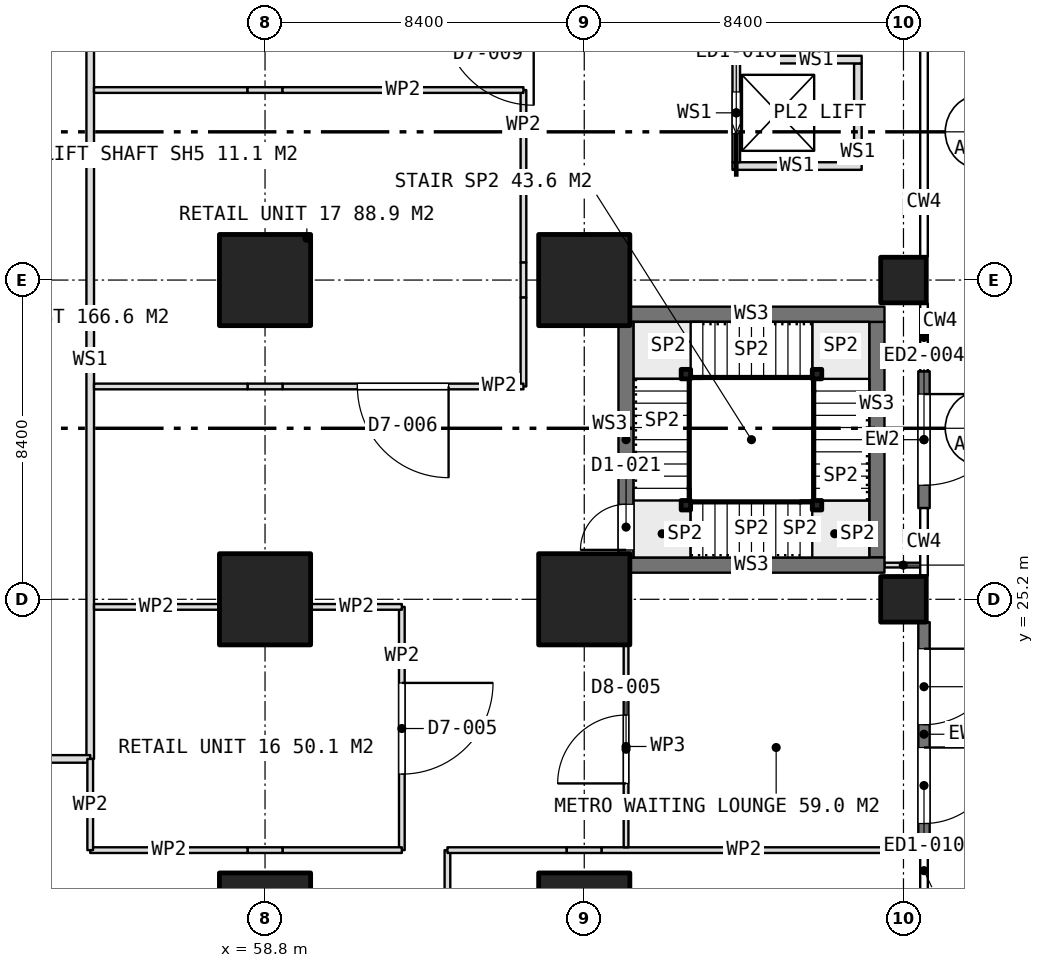
"""IFC4 building model, lengths in metres.
Left out: names, types, materials, properties, quantities, classifications, styles, units other than length and angle.
Written with IfcOpenShell. Run it as: python <this file> out.ifc"""

import sys

from ifc_helpers import new_model, si_unit, direction, frame, frame_2d, origin, origin_2d, place, context, subcontext, project, spatial, rectangle, extrude, element, fill, save


model = new_model("IFC4")
c1 = context("Model", 3, precision=1e-05, world=origin(), true_north=direction((0.0, 1.0)))
c2 = subcontext(c1, "Body", "Model", "MODEL_VIEW")
j1 = project(units=[si_unit("LENGTHUNIT", "METRE"), si_unit("PLANEANGLEUNIT", "RADIAN")], contexts=[c1])
p1 = place(None, origin())
s1 = spatial("IfcSite", under=j1, at=p1, CompositionType="ELEMENT")
p2 = place(p1, origin())
s2 = spatial("IfcBuilding", under=s1, at=p2, CompositionType="ELEMENT")
p3 = place(p2, origin())
s3 = spatial("IfcBuildingStorey", under=s2, at=p3, CompositionType="ELEMENT", Elevation=0.0)
for number, where, z_axis, x_axis in (
    (1, (58.8, 16.8, 0.0), (0.0, 0.0, 1.0), (1.0, 0.0, 0.0)),
    (2, (58.8, 25.2, 0.0), (0.0, 0.0, 1.0), (1.0, 0.0, 0.0)),
    (3, (58.8, 33.6, 0.0), (0.0, 0.0, 1.0), (1.0, 0.0, 0.0)),
    (4, (67.2, 16.8, 0.0), (0.0, 0.0, 1.0), (1.0, 0.0, 0.0)),
    (5, (67.2, 25.2, 0.0), (0.0, 0.0, 1.0), (1.0, 0.0, 0.0)),
    (6, (67.2, 33.6, 0.0), (0.0, 0.0, 1.0), (1.0, 0.0, 0.0)),
):
    element("IfcColumn", number, at=place(p3, frame(where, z_axis=z_axis, x_axis=x_axis)), inside=s3, PredefinedType="COLUMN", context=c2, shape_type="SweptSolid", body=[
        extrude(rectangle(XDim=2.4, YDim=2.4, at=origin_2d()), origin(), (0.0, 0.0, 1.0), 5.4),
    ])
for number, where, z_axis, x_axis in (
    (7, (75.6, 25.2, 0.0), (0.0, 0.0, 1.0), (1.0, 0.0, 0.0)),
    (8, (75.6, 33.6, 0.0), (0.0, 0.0, 1.0), (1.0, 0.0, 0.0)),
):
    element("IfcColumn", number, at=place(p3, frame(where, z_axis=z_axis, x_axis=x_axis)), inside=s3, PredefinedType="COLUMN", context=c2, shape_type="SweptSolid", body=[
        extrude(rectangle(XDim=1.2, YDim=1.2, at=origin_2d()), origin(), (0.0, 0.0, 1.0), 5.4),
    ])
p4 = place(p3, frame((76.14, 24.599, 0.0), z_axis=(0.0, 0.0, 1.0), x_axis=(0.0, -1.0, 0.0)))
e9 = element("IfcWall", 9, at=p4, inside=s3, PredefinedType="SOLIDWALL", context=c2, shape_type="SweptSolid", body=[
    extrude(rectangle(XDim=5.899, YDim=0.3, at=frame_2d((2.95, 0.0))), origin(), (0.0, 0.0, 1.0), 3.3),
])
p5 = place(p4, frame((3.299, 0.0, 0.0)))
e10 = element("IfcOpeningElement", 10, at=p5, cuts=e9, PredefinedType="OPENING", context=c2, shape_type="SweptSolid", body=[
    extrude(rectangle(XDim=2.0, YDim=2.7, at=frame_2d((1.0, 1.35))), frame((0.0, 0.16, 0.0), z_axis=(0.0, -1.0, 0.0), x_axis=(1.0, 0.0, 0.0)), (0.0, 0.0, 1.0), 0.32),
])
p6 = place(p4, frame((0.699, 0.0, 0.0)))
e11 = element("IfcOpeningElement", 11, at=p6, cuts=e9, PredefinedType="OPENING", context=c2, shape_type="SweptSolid", body=[
    extrude(rectangle(XDim=2.0, YDim=2.7, at=frame_2d((1.0, 1.35))), frame((0.0, 0.16, 0.0), z_axis=(0.0, -1.0, 0.0), x_axis=(1.0, 0.0, 0.0)), (0.0, 0.0, 1.0), 0.32),
])
p7 = place(p3, frame((76.14, 31.2, 0.0), z_axis=(0.0, 0.0, 1.0), x_axis=(0.0, -1.0, 0.0)))
e12 = element("IfcWall", 12, at=p7, inside=s3, PredefinedType="SOLIDWALL", context=c2, shape_type="SweptSolid", body=[
    extrude(rectangle(XDim=3.6, YDim=0.3, at=frame_2d((1.8, 0.0))), origin(), (0.0, 0.0, 1.0), 3.3),
])
p8 = place(p7, frame((0.6, 0.0, 0.0)))
e13 = element("IfcOpeningElement", 13, at=p8, cuts=e12, PredefinedType="OPENING", context=c2, shape_type="SweptSolid", body=[
    extrude(rectangle(XDim=2.4, YDim=2.4, at=frame_2d((1.2, 1.2))), frame((0.0, 0.16, 0.0), z_axis=(0.0, -1.0, 0.0), x_axis=(1.0, 0.0, 0.0)), (0.0, 0.0, 1.0), 0.32),
])
for number, where, z_axis, x_axis in (
    (14, (68.1, 26.1, 0.0), (0.0, 0.0, 1.0), (1.0, 0.0, 0.0)),
    (15, (68.1, 32.7, 0.0), (0.0, 0.0, 1.0), (1.0, 0.0, 0.0)),
):
    element("IfcWall", number, at=place(p3, frame(where, z_axis=z_axis, x_axis=x_axis)), inside=s3, PredefinedType="SOLIDWALL", context=c2, shape_type="SweptSolid", body=[
        extrude(rectangle(XDim=7.0, YDim=0.4, at=frame_2d((3.5, 0.0))), origin(), (0.0, 0.0, 1.0), 5.1),
    ])
p9 = place(p3, frame((68.3, 26.3, 0.0), z_axis=(0.0, 0.0, 1.0), x_axis=(0.0, 1.0, 0.0)))
e16 = element("IfcWall", 16, at=p9, inside=s3, PredefinedType="SOLIDWALL", context=c2, shape_type="SweptSolid", body=[
    extrude(rectangle(XDim=6.2, YDim=0.4, at=frame_2d((3.1, 0.0))), origin(), (0.0, 0.0, 1.0), 5.1),
])
p10 = place(p9, frame((0.2, 0.0, 0.0)))
e17 = element("IfcOpeningElement", 17, at=p10, cuts=e16, PredefinedType="OPENING", context=c2, shape_type="SweptSolid", body=[
    extrude(rectangle(XDim=1.2, YDim=2.1, at=frame_2d((0.6, 1.05))), frame((0.0, 0.21, 0.0), z_axis=(0.0, -1.0, 0.0), x_axis=(1.0, 0.0, 0.0)), (0.0, 0.0, 1.0), 0.42),
])
p11 = place(p3, frame((74.9, 26.3, 0.0), z_axis=(0.0, 0.0, 1.0), x_axis=(0.0, 1.0, 0.0)))
e18 = element("IfcWall", 18, at=p11, inside=s3, PredefinedType="SOLIDWALL", context=c2, shape_type="SweptSolid", body=[
    extrude(rectangle(XDim=6.2, YDim=0.4, at=frame_2d((3.1, 0.0))), origin(), (0.0, 0.0, 1.0), 5.1),
])
for number, where, z_axis, x_axis in (
    (19, (71.1, 36.6, 0.0), (0.0, 0.0, 1.0), (1.0, 0.0, 0.0)),
    (20, (71.1, 39.4, 0.0), (0.0, 0.0, 1.0), (1.0, 0.0, 0.0)),
):
    element("IfcWall", number, at=place(p3, frame(where, z_axis=z_axis, x_axis=x_axis)), inside=s3, PredefinedType="PARTITIONING", context=c2, shape_type="SweptSolid", body=[
        extrude(rectangle(XDim=3.4, YDim=0.2, at=frame_2d((1.7, 0.0))), origin(), (0.0, 0.0, 1.0), 3.3),
    ])
p12 = place(p3, frame((71.2, 36.7, 0.0), z_axis=(0.0, 0.0, 1.0), x_axis=(0.0, 1.0, 0.0)))
e21 = element("IfcWall", 21, at=p12, inside=s3, PredefinedType="PARTITIONING", context=c2, shape_type="SweptSolid", body=[
    extrude(rectangle(XDim=2.6, YDim=0.2, at=frame_2d((1.3, 0.0))), origin(), (0.0, 0.0, 1.0), 3.3),
])
p13 = place(p12, frame((0.75, 0.0, 0.0)))
e22 = element("IfcOpeningElement", 22, at=p13, cuts=e21, PredefinedType="OPENING", context=c2, shape_type="SweptSolid", body=[
    extrude(rectangle(XDim=1.1, YDim=2.1, at=frame_2d((0.55, 1.05))), frame((0.0, 0.11, 0.0), z_axis=(0.0, -1.0, 0.0), x_axis=(1.0, 0.0, 0.0)), (0.0, 0.0, 1.0), 0.22),
])
p14 = place(p3, frame((74.4, 36.7, 0.0), z_axis=(0.0, 0.0, 1.0), x_axis=(0.0, 1.0, 0.0)))
e23 = element("IfcWall", 23, at=p14, inside=s3, PredefinedType="PARTITIONING", context=c2, shape_type="SweptSolid", body=[
    extrude(rectangle(XDim=2.6, YDim=0.2, at=frame_2d((1.3, 0.0))), origin(), (0.0, 0.0, 1.0), 3.3),
])
p15 = place(p3, frame((54.2, 42.0, 0.0), z_axis=(0.0, 0.0, 1.0), x_axis=(0.0, -1.0, 0.0)))
e24 = element("IfcWall", 24, at=p15, inside=s3, PredefinedType="PARTITIONING", context=c2, shape_type="SweptSolid", body=[
    extrude(rectangle(XDim=21.0, YDim=0.2, at=frame_2d((10.5, 0.0))), origin(), (0.0, 0.0, 1.0), 5.1),
])
p16 = place(p3, frame((54.2, 21.0, 0.0), z_axis=(0.0, 0.0, 1.0), x_axis=(-1.0, 0.0, 0.0)))
e25 = element("IfcWall", 25, at=p16, inside=s3, PredefinedType="PARTITIONING", context=c2, shape_type="SweptSolid", body=[
    extrude(rectangle(XDim=3.3, YDim=0.2, at=frame_2d((1.65, 0.0))), origin(), (0.0, 0.0, 1.0), 5.1),
])
p17 = place(p3, frame((63.6, 17.26, 0.0), z_axis=(0.0, 0.0, 1.0), x_axis=(0.0, 1.0, 0.0)))
e26 = element("IfcWall", 26, at=p17, inside=s3, PredefinedType="PARTITIONING", context=c2, shape_type="SweptSolid", body=[
    extrude(rectangle(XDim=1.34, YDim=0.15, at=frame_2d((0.67, 0.0))), origin(), (0.0, 0.0, 1.0), 5.1),
])
p18 = place(p3, frame((63.6, 18.6, 0.0), z_axis=(0.0, 0.0, 1.0), x_axis=(1.0, 0.0, 0.0)))
e27 = element("IfcWall", 27, at=p18, inside=s3, PredefinedType="PARTITIONING", context=c2, shape_type="SweptSolid", body=[
    extrude(rectangle(XDim=3.14, YDim=0.15, at=frame_2d((1.57, 0.0))), origin(), (0.0, 0.0, 1.0), 5.1),
])
p19 = place(p3, frame((66.74, 18.6, 0.0), z_axis=(0.0, 0.0, 1.0), x_axis=(1.0, 0.0, 0.0)))
e28 = element("IfcWall", 28, at=p19, inside=s3, PredefinedType="PARTITIONING", context=c2, shape_type="SweptSolid", body=[
    extrude(rectangle(XDim=0.92, YDim=0.15, at=frame_2d((0.46, 0.0))), origin(), (0.0, 0.0, 1.0), 3.3),
])
p20 = place(p3, frame((67.66, 18.6, 0.0), z_axis=(0.0, 0.0, 1.0), x_axis=(1.0, 0.0, 0.0)))
e29 = element("IfcWall", 29, at=p20, inside=s3, PredefinedType="PARTITIONING", context=c2, shape_type="SweptSolid", body=[
    extrude(rectangle(XDim=7.48, YDim=0.15, at=frame_2d((3.74, 0.0))), origin(), (0.0, 0.0, 1.0), 5.1),
])
p21 = place(p3, frame((75.14, 18.6, 0.0), z_axis=(0.0, 0.0, 1.0), x_axis=(1.0, 0.0, 0.0)))
e30 = element("IfcWall", 30, at=p21, inside=s3, PredefinedType="PARTITIONING", context=c2, shape_type="SweptSolid", body=[
    extrude(rectangle(XDim=0.91, YDim=0.15, at=frame_2d((0.455, 0.0))), origin(), (0.0, 0.0, 1.0), 3.3),
])
p22 = place(p3, frame((62.4, 25.0, 0.0), z_axis=(0.0, 0.0, 1.0), x_axis=(0.0, -1.0, 0.0)))
e31 = element("IfcWall", 31, at=p22, inside=s3, PredefinedType="PARTITIONING", context=c2, shape_type="SweptSolid", body=[
    extrude(rectangle(XDim=6.4, YDim=0.15, at=frame_2d((3.2, 0.0))), origin(), (0.0, 0.0, 1.0), 3.3),
])
p23 = place(p22, frame((2.0, 0.0, 0.0)))
e32 = element("IfcOpeningElement", 32, at=p23, cuts=e31, PredefinedType="OPENING", context=c2, shape_type="SweptSolid", body=[
    extrude(rectangle(XDim=2.4, YDim=2.4, at=frame_2d((1.2, 1.2))), frame((0.0, 0.085, 0.0), z_axis=(0.0, -1.0, 0.0), x_axis=(1.0, 0.0, 0.0)), (0.0, 0.0, 1.0), 0.17),
])
p24 = place(p3, frame((62.4, 18.6, 0.0), z_axis=(0.0, 0.0, 1.0), x_axis=(-1.0, 0.0, 0.0)))
e33 = element("IfcWall", 33, at=p24, inside=s3, PredefinedType="PARTITIONING", context=c2, shape_type="SweptSolid", body=[
    extrude(rectangle(XDim=3.14, YDim=0.15, at=frame_2d((1.57, 0.0))), origin(), (0.0, 0.0, 1.0), 5.1),
])
p25 = place(p3, frame((59.26, 18.6, 0.0), z_axis=(0.0, 0.0, 1.0), x_axis=(-1.0, 0.0, 0.0)))
e34 = element("IfcWall", 34, at=p25, inside=s3, PredefinedType="PARTITIONING", context=c2, shape_type="SweptSolid", body=[
    extrude(rectangle(XDim=0.92, YDim=0.15, at=frame_2d((0.46, 0.0))), origin(), (0.0, 0.0, 1.0), 3.3),
])
p26 = place(p3, frame((58.34, 18.6, 0.0), z_axis=(0.0, 0.0, 1.0), x_axis=(-1.0, 0.0, 0.0)))
e35 = element("IfcWall", 35, at=p26, inside=s3, PredefinedType="PARTITIONING", context=c2, shape_type="SweptSolid", body=[
    extrude(rectangle(XDim=4.14, YDim=0.15, at=frame_2d((2.07, 0.0))), origin(), (0.0, 0.0, 1.0), 5.1),
])
p27 = place(p3, frame((54.2, 18.6, 0.0), z_axis=(0.0, 0.0, 1.0), x_axis=(0.0, 1.0, 0.0)))
e36 = element("IfcWall", 36, at=p27, inside=s3, PredefinedType="PARTITIONING", context=c2, shape_type="SweptSolid", body=[
    extrude(rectangle(XDim=2.4, YDim=0.15, at=frame_2d((1.2, 0.0))), origin(), (0.0, 0.0, 1.0), 5.1),
])
p28 = place(p3, frame((54.3, 25.0, 0.0), z_axis=(0.0, 0.0, 1.0), x_axis=(1.0, 0.0, 0.0)))
e37 = element("IfcWall", 37, at=p28, inside=s3, PredefinedType="PARTITIONING", context=c2, shape_type="SweptSolid", body=[
    extrude(rectangle(XDim=3.28, YDim=0.15, at=frame_2d((1.64, 0.0))), origin(), (0.0, 0.0, 1.0), 5.1),
])
p29 = place(p3, frame((60.02, 25.0, 0.0), z_axis=(0.0, 0.0, 1.0), x_axis=(1.0, 0.0, 0.0)))
e38 = element("IfcWall", 38, at=p29, inside=s3, PredefinedType="PARTITIONING", context=c2, shape_type="SweptSolid", body=[
    extrude(rectangle(XDim=2.38, YDim=0.15, at=frame_2d((1.19, 0.0))), origin(), (0.0, 0.0, 1.0), 3.3),
])
p30 = place(p3, frame((65.6, 38.6, 0.0), z_axis=(0.0, 0.0, 1.0), x_axis=(0.0, -1.0, 0.0)))
e39 = element("IfcWall", 39, at=p30, inside=s3, PredefinedType="PARTITIONING", context=c2, shape_type="SweptSolid", body=[
    extrude(rectangle(XDim=4.54, YDim=0.15, at=frame_2d((2.27, 0.0))), origin(), (0.0, 0.0, 1.0), 5.1),
])
p31 = place(p3, frame((65.6, 34.06, 0.0), z_axis=(0.0, 0.0, 1.0), x_axis=(0.0, -1.0, 0.0)))
e40 = element("IfcWall", 40, at=p31, inside=s3, PredefinedType="PARTITIONING", context=c2, shape_type="SweptSolid", body=[
    extrude(rectangle(XDim=0.92, YDim=0.15, at=frame_2d((0.46, 0.0))), origin(), (0.0, 0.0, 1.0), 3.3),
])
p32 = place(p3, frame((65.6, 33.14, 0.0), z_axis=(0.0, 0.0, 1.0), x_axis=(0.0, -1.0, 0.0)))
e41 = element("IfcWall", 41, at=p32, inside=s3, PredefinedType="PARTITIONING", context=c2, shape_type="SweptSolid", body=[
    extrude(rectangle(XDim=2.34, YDim=0.15, at=frame_2d((1.17, 0.0))), origin(), (0.0, 0.0, 1.0), 5.1),
])
p33 = place(p3, frame((65.6, 30.8, 0.0), z_axis=(0.0, 0.0, 1.0), x_axis=(-1.0, 0.0, 0.0)))
e42 = element("IfcWall", 42, at=p33, inside=s3, PredefinedType="PARTITIONING", context=c2, shape_type="SweptSolid", body=[
    extrude(rectangle(XDim=6.34, YDim=0.15, at=frame_2d((3.17, 0.0))), origin(), (0.0, 0.0, 1.0), 5.1),
])
p34 = place(p33, frame((1.97, 0.0, 0.0)))
e43 = element("IfcOpeningElement", 43, at=p34, cuts=e42, PredefinedType="OPENING", context=c2, shape_type="SweptSolid", body=[
    extrude(rectangle(XDim=2.4, YDim=2.4, at=frame_2d((1.2, 1.2))), frame((0.0, 0.085, 0.0), z_axis=(0.0, -1.0, 0.0), x_axis=(1.0, 0.0, 0.0)), (0.0, 0.0, 1.0), 0.17),
])
p35 = place(p3, frame((59.26, 30.8, 0.0), z_axis=(0.0, 0.0, 1.0), x_axis=(-1.0, 0.0, 0.0)))
e44 = element("IfcWall", 44, at=p35, inside=s3, PredefinedType="PARTITIONING", context=c2, shape_type="SweptSolid", body=[
    extrude(rectangle(XDim=0.92, YDim=0.15, at=frame_2d((0.46, 0.0))), origin(), (0.0, 0.0, 1.0), 3.3),
])
for number, where, z_axis, x_axis in (
    (45, (58.34, 30.8, 0.0), (0.0, 0.0, 1.0), (-1.0, 0.0, 0.0)),
    (46, (54.3, 38.6, 0.0), (0.0, 0.0, 1.0), (1.0, 0.0, 0.0)),
):
    element("IfcWall", number, at=place(p3, frame(where, z_axis=z_axis, x_axis=x_axis)), inside=s3, PredefinedType="PARTITIONING", context=c2, shape_type="SweptSolid", body=[
        extrude(rectangle(XDim=4.04, YDim=0.15, at=frame_2d((2.02, 0.0))), origin(), (0.0, 0.0, 1.0), 5.1),
    ])
p36 = place(p3, frame((58.34, 38.6, 0.0), z_axis=(0.0, 0.0, 1.0), x_axis=(1.0, 0.0, 0.0)))
e47 = element("IfcWall", 47, at=p36, inside=s3, PredefinedType="PARTITIONING", context=c2, shape_type="SweptSolid", body=[
    extrude(rectangle(XDim=0.92, YDim=0.15, at=frame_2d((0.46, 0.0))), origin(), (0.0, 0.0, 1.0), 3.3),
])
p37 = place(p3, frame((59.26, 38.6, 0.0), z_axis=(0.0, 0.0, 1.0), x_axis=(1.0, 0.0, 0.0)))
e48 = element("IfcWall", 48, at=p37, inside=s3, PredefinedType="PARTITIONING", context=c2, shape_type="SweptSolid", body=[
    extrude(rectangle(XDim=6.34, YDim=0.15, at=frame_2d((3.17, 0.0))), origin(), (0.0, 0.0, 1.0), 5.1),
])
p38 = place(p3, frame((68.3, 18.675, 0.0), z_axis=(0.0, 0.0, 1.0), x_axis=(0.0, 1.0, 0.0)))
e49 = element("IfcWall", 49, at=p38, inside=s3, PredefinedType="PARTITIONING", context=c2, shape_type="SweptSolid", body=[
    extrude(rectangle(XDim=5.305, YDim=0.125, at=frame_2d((2.652, 0.0))), origin(), (0.0, 0.0, 1.0), 5.1),
])
p39 = place(p38, frame((1.68, 0.0, 0.0)))
e50 = element("IfcOpeningElement", 50, at=p39, cuts=e49, PredefinedType="OPENING", context=c2, shape_type="SweptSolid", body=[
    extrude(rectangle(XDim=1.8, YDim=2.1, at=frame_2d((0.9, 1.05))), frame((0.0, 0.073, 0.0), z_axis=(0.0, -1.0, 0.0), x_axis=(1.0, 0.0, 0.0)), (0.0, 0.0, 1.0), 0.145),
])
p40 = place(p3, frame((75.1, 26.1, 0.0), z_axis=(0.0, 0.0, 1.0), x_axis=(1.0, 0.0, 0.0)))
e51 = element("IfcWall", 51, at=p40, inside=s3, PredefinedType="PARTITIONING", context=c2, shape_type="SweptSolid", body=[
    extrude(rectangle(XDim=0.99, YDim=0.125, at=frame_2d((0.495, 0.0))), origin(), (0.0, 0.0, 1.0), 3.3),
])
for number, where, z_axis, x_axis in (
    (52, (69.875, 27.675, 0.0), (0.0, 0.0, 1.0), (1.0, 0.0, 0.0)),
    (53, (73.325, 27.675, 0.0), (0.0, 0.0, 1.0), (1.0, 0.0, 0.0)),
    (54, (73.325, 31.125, 0.0), (0.0, 0.0, 1.0), (1.0, 0.0, 0.0)),
    (55, (69.875, 31.125, 0.0), (0.0, 0.0, 1.0), (1.0, 0.0, 0.0)),
):
    element("IfcColumn", number, at=place(p3, frame(where, z_axis=z_axis, x_axis=x_axis)), inside=s3, PredefinedType="COLUMN", context=c2, shape_type="SweptSolid", body=[
        extrude(rectangle(XDim=0.25, YDim=0.25, at=origin_2d()), origin(), (0.0, 0.0, 1.0), 5.4),
    ])
p41 = place(p5, origin())
e56 = element("IfcDoor", 56, at=p41, inside=s3, OperationType="DOUBLE_DOOR_SINGLE_SWING", PredefinedType="DOOR", context=c2, shape_type="SweptSolid", body=[
    extrude(rectangle(XDim=2.0, YDim=2.7, at=frame_2d((1.0, 1.35))), frame((0.0, 0.025, 0.0), z_axis=(0.0, -1.0, 0.0), x_axis=(1.0, 0.0, 0.0)), (0.0, 0.0, 1.0), 0.05),
])
fill(e10, e56)
p42 = place(p6, origin())
e57 = element("IfcDoor", 57, at=p42, inside=s3, OperationType="DOUBLE_DOOR_SINGLE_SWING", PredefinedType="DOOR", context=c2, shape_type="SweptSolid", body=[
    extrude(rectangle(XDim=2.0, YDim=2.7, at=frame_2d((1.0, 1.35))), frame((0.0, 0.025, 0.0), z_axis=(0.0, -1.0, 0.0), x_axis=(1.0, 0.0, 0.0)), (0.0, 0.0, 1.0), 0.05),
])
fill(e11, e57)
p43 = place(p8, origin())
e58 = element("IfcDoor", 58, at=p43, inside=s3, OperationType="DOUBLE_DOOR_SINGLE_SWING", PredefinedType="DOOR", context=c2, shape_type="SweptSolid", body=[
    extrude(rectangle(XDim=2.4, YDim=2.4, at=frame_2d((1.2, 1.2))), frame((0.0, 0.025, 0.0), z_axis=(0.0, -1.0, 0.0), x_axis=(1.0, 0.0, 0.0)), (0.0, 0.0, 1.0), 0.05),
])
fill(e13, e58)
p44 = place(p13, origin())
e59 = element("IfcDoor", 59, at=p44, inside=s3, OperationType="SLIDING_TO_LEFT", PredefinedType="USERDEFINED", context=c2, shape_type="SweptSolid", body=[
    extrude(rectangle(XDim=1.1, YDim=2.1, at=frame_2d((0.55, 1.05))), frame((0.0, 0.025, 0.0), z_axis=(0.0, -1.0, 0.0), x_axis=(1.0, 0.0, 0.0)), (0.0, 0.0, 1.0), 0.05),
])
fill(e22, e59)
p45 = place(p23, origin())
e60 = element("IfcDoor", 60, at=p45, inside=s3, OperationType="DOUBLE_DOOR_SINGLE_SWING", PredefinedType="DOOR", context=c2, shape_type="SweptSolid", body=[
    extrude(rectangle(XDim=2.4, YDim=2.4, at=frame_2d((1.2, 1.2))), frame((0.0, 0.025, 0.0), z_axis=(0.0, -1.0, 0.0), x_axis=(1.0, 0.0, 0.0)), (0.0, 0.0, 1.0), 0.05),
])
fill(e32, e60)
p46 = place(p34, origin())
e61 = element("IfcDoor", 61, at=p46, inside=s3, OperationType="DOUBLE_DOOR_SINGLE_SWING", PredefinedType="DOOR", context=c2, shape_type="SweptSolid", body=[
    extrude(rectangle(XDim=2.4, YDim=2.4, at=frame_2d((1.2, 1.2))), frame((0.0, 0.025, 0.0), z_axis=(0.0, -1.0, 0.0), x_axis=(1.0, 0.0, 0.0)), (0.0, 0.0, 1.0), 0.05),
])
fill(e43, e61)
p47 = place(p39, origin())
e62 = element("IfcDoor", 62, at=p47, inside=s3, OperationType="DOUBLE_DOOR_SINGLE_SWING", PredefinedType="DOOR", context=c2, shape_type="SweptSolid", body=[
    extrude(rectangle(XDim=1.8, YDim=2.1, at=frame_2d((0.9, 1.05))), frame((0.0, 0.025, 0.0), z_axis=(0.0, -1.0, 0.0), x_axis=(1.0, 0.0, 0.0)), (0.0, 0.0, 1.0), 0.05),
])
fill(e50, e62)
p48 = place(p10, origin())
e63 = element("IfcDoor", 63, at=p48, inside=s3, OperationType="SINGLE_SWING_RIGHT", PredefinedType="DOOR", context=c2, shape_type="SweptSolid", body=[
    extrude(rectangle(XDim=1.2, YDim=2.1, at=frame_2d((0.6, 1.05))), frame((0.0, 0.025, 0.0), z_axis=(0.0, -1.0, 0.0), x_axis=(1.0, 0.0, 0.0)), (0.0, 0.0, 1.0), 0.05),
])
fill(e17, e63)
save(model, sys.argv[1])
